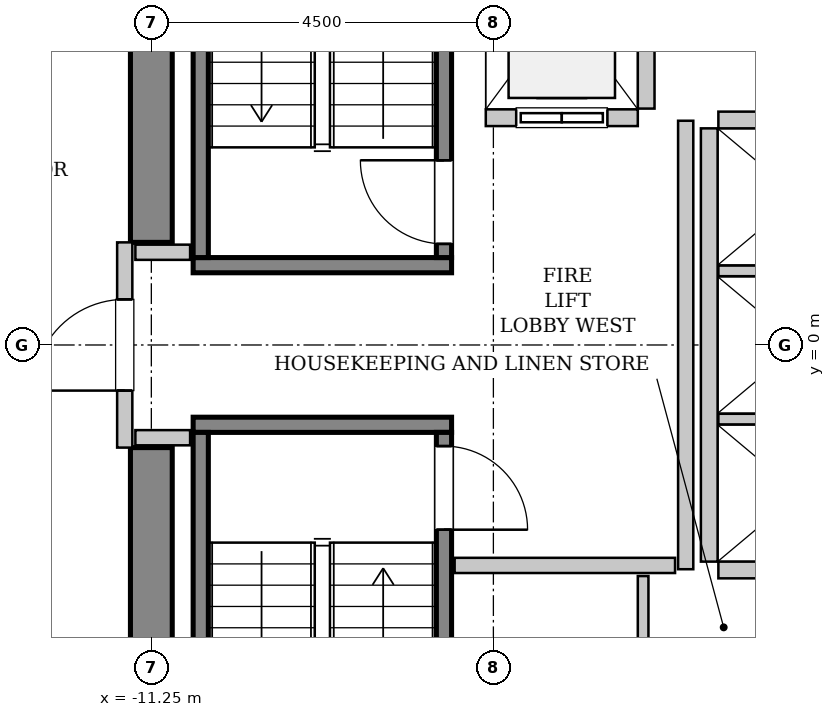
"""IFC4 building model, lengths in metres.
Left out: names, types, materials, properties, quantities, classifications, styles, units other than length and angle.
Written with IfcOpenShell. Run it as: python <this file> out.ifc"""

import sys

from ifc_helpers import new_model, si_unit, direction, frame, frame_2d, origin, place, context, subcontext, project, spatial, rectangle, extrude, source, transform, mapped, element, fill, save


model = new_model("IFC4")
c1 = context("Model", 3, precision=1e-05, world=origin(), true_north=direction((0.0, 1.0)))
c2 = subcontext(c1, "Body", "Model", "MODEL_VIEW")
j1 = project(units=[si_unit("LENGTHUNIT", "METRE"), si_unit("PLANEANGLEUNIT", "RADIAN")], contexts=[c1])
p1 = place(None, origin())
s1 = spatial("IfcSite", under=j1, at=p1, CompositionType="ELEMENT")
p2 = place(p1, origin())
s2 = spatial("IfcBuilding", under=s1, at=p2, CompositionType="ELEMENT")
p3 = place(p2, frame((0.0, 0.0, 109.8)))
s3 = spatial("IfcBuildingStorey", under=s2, at=p3, CompositionType="ELEMENT", Elevation=109.8)
m1 = source(origin(), c2, "Body", "SweptSolid", [
    extrude(rectangle(XDim=7.375, YDim=0.55, at=frame_2d((3.688, 0.0))), origin(), (0.0, 0.0, 1.0), 3.8),
])
for number, where, z_axis, x_axis in (
    (1, (-11.25, -8.725, 0.0), (0.0, 0.0, 1.0), (0.0, 1.0, 0.0)),
    (2, (-11.25, 1.35, 0.0), (0.0, 0.0, 1.0), (0.0, 1.0, 0.0)),
):
    element("IfcWall", number, at=place(p3, frame(where, z_axis=z_axis, x_axis=x_axis)), inside=s3, PredefinedType="SHEAR", context=c2, shape_type="MappedRepresentation", body=[
        mapped(m1, transform((0.0, 0.0, 0.0), x_axis=(1.0, 0.0, 0.0), y_axis=(0.0, 1.0, 0.0), z_axis=(0.0, 0.0, 1.0), scale=1.0)),
    ])
m2 = source(origin(), c2, "Body", "SweptSolid", [
    extrude(rectangle(XDim=3.4, YDim=0.2, at=frame_2d((1.7, 0.0))), origin(), (0.0, 0.0, 1.0), 3.8),
])
p4 = place(p3, frame((-7.3, 1.05, 0.0), z_axis=(0.0, 0.0, 1.0), x_axis=(-1.0, 0.0, 0.0)))
e3 = element("IfcWall", 3, at=p4, inside=s3, PredefinedType="SOLIDWALL", context=c2, shape_type="MappedRepresentation", body=[
    mapped(m2, transform((0.0, 0.0, 0.0), x_axis=(1.0, 0.0, 0.0), y_axis=(0.0, 1.0, 0.0), z_axis=(0.0, 0.0, 1.0), scale=1.0)),
])
m3 = source(origin(), c2, "Body", "SweptSolid", [
    extrude(rectangle(XDim=7.1, YDim=0.2, at=frame_2d((3.55, 0.0))), origin(), (0.0, 0.0, 1.0), 3.8),
])
p5 = place(p3, frame((-7.4, 1.15, 0.0), z_axis=(0.0, 0.0, 1.0), x_axis=(0.0, 1.0, 0.0)))
e4 = element("IfcWall", 4, at=p5, inside=s3, PredefinedType="SOLIDWALL", context=c2, shape_type="MappedRepresentation", body=[
    mapped(m3, transform((0.0, 0.0, 0.0), x_axis=(1.0, 0.0, 0.0), y_axis=(0.0, 1.0, 0.0), z_axis=(0.0, 0.0, 1.0), scale=1.0)),
])
p6 = place(p5, frame((0.18, 0.0, 0.0)))
e5 = element("IfcOpeningElement", 5, at=p6, cuts=e4, PredefinedType="OPENING", context=c2, shape_type="SweptSolid", body=[
    extrude(rectangle(XDim=1.1, YDim=2.15, at=frame_2d((0.55, 1.075))), frame((0.0, 0.11, 0.0), z_axis=(0.0, -1.0, 0.0), x_axis=(1.0, 0.0, 0.0)), (0.0, 0.0, 1.0), 0.22),
])
p7 = place(p3, frame((-10.6, 1.15, 0.0), z_axis=(0.0, 0.0, 1.0), x_axis=(0.0, 1.0, 0.0)))
e6 = element("IfcWall", 6, at=p7, inside=s3, PredefinedType="SOLIDWALL", context=c2, shape_type="MappedRepresentation", body=[
    mapped(m3, transform((0.0, 0.0, 0.0), x_axis=(1.0, 0.0, 0.0), y_axis=(0.0, 1.0, 0.0), z_axis=(0.0, 0.0, 1.0), scale=1.0)),
])
p8 = place(p3, frame((-10.7, -1.05, 0.0), z_axis=(0.0, 0.0, 1.0), x_axis=(1.0, 0.0, 0.0)))
e7 = element("IfcWall", 7, at=p8, inside=s3, PredefinedType="SOLIDWALL", context=c2, shape_type="MappedRepresentation", body=[
    mapped(m2, transform((0.0, 0.0, 0.0), x_axis=(1.0, 0.0, 0.0), y_axis=(0.0, 1.0, 0.0), z_axis=(0.0, 0.0, 1.0), scale=1.0)),
])
p9 = place(p3, frame((-10.6, -1.15, 0.0), z_axis=(0.0, 0.0, 1.0), x_axis=(0.0, -1.0, 0.0)))
e8 = element("IfcWall", 8, at=p9, inside=s3, PredefinedType="SOLIDWALL", context=c2, shape_type="MappedRepresentation", body=[
    mapped(m3, transform((0.0, 0.0, 0.0), x_axis=(1.0, 0.0, 0.0), y_axis=(0.0, 1.0, 0.0), z_axis=(0.0, 0.0, 1.0), scale=1.0)),
])
p10 = place(p3, frame((-7.4, -1.15, 0.0), z_axis=(0.0, 0.0, 1.0), x_axis=(0.0, -1.0, 0.0)))
e9 = element("IfcWall", 9, at=p10, inside=s3, PredefinedType="SOLIDWALL", context=c2, shape_type="MappedRepresentation", body=[
    mapped(m3, transform((0.0, 0.0, 0.0), x_axis=(1.0, 0.0, 0.0), y_axis=(0.0, 1.0, 0.0), z_axis=(0.0, 0.0, 1.0), scale=1.0)),
])
p11 = place(p10, frame((0.18, 0.0, 0.0)))
e10 = element("IfcOpeningElement", 10, at=p11, cuts=e9, PredefinedType="OPENING", context=c2, shape_type="SweptSolid", body=[
    extrude(rectangle(XDim=1.1, YDim=2.15, at=frame_2d((0.55, 1.075))), frame((0.0, 0.11, 0.0), z_axis=(0.0, -1.0, 0.0), x_axis=(1.0, 0.0, 0.0)), (0.0, 0.0, 1.0), 0.22),
])
m4 = source(origin(), c2, "Body", "SweptSolid", [
    extrude(rectangle(XDim=2.0, YDim=0.22, at=frame_2d((1.0, 0.0))), origin(), (0.0, 0.0, 1.0), 3.535),
])
p12 = place(p3, frame((-6.85, 2.99, 0.0), z_axis=(0.0, 0.0, 1.0), x_axis=(1.0, 0.0, 0.0)))
e11 = element("IfcWall", 11, at=p12, inside=s3, PredefinedType="SOLIDWALL", context=c2, shape_type="MappedRepresentation", body=[
    mapped(m4, transform((0.0, 0.0, 0.0), x_axis=(1.0, 0.0, 0.0), y_axis=(0.0, 1.0, 0.0), z_axis=(0.0, 0.0, 1.0), scale=1.0)),
])
p13 = place(p12, frame((0.4, 0.0, 0.0)))
e12 = element("IfcOpeningElement", 12, at=p13, cuts=e11, PredefinedType="OPENING", context=c2, shape_type="SweptSolid", body=[
    extrude(rectangle(XDim=1.2, YDim=2.2, at=frame_2d((0.6, 1.1))), frame((0.0, 0.12, 0.0), z_axis=(0.0, -1.0, 0.0), x_axis=(1.0, 0.0, 0.0)), (0.0, 0.0, 1.0), 0.24),
])
m5 = source(origin(), c2, "Body", "SweptSolid", [
    extrude(rectangle(XDim=2.68, YDim=0.22, at=frame_2d((1.34, 0.0))), origin(), (0.0, 0.0, 1.0), 3.535),
])
p14 = place(p3, frame((-4.74, 3.11, 0.0), z_axis=(0.0, 0.0, 1.0), x_axis=(0.0, 1.0, 0.0)))
e13 = element("IfcWall", 13, at=p14, inside=s3, PredefinedType="SOLIDWALL", context=c2, shape_type="MappedRepresentation", body=[
    mapped(m5, transform((0.0, 0.0, 0.0), x_axis=(1.0, 0.0, 0.0), y_axis=(0.0, 1.0, 0.0), z_axis=(0.0, 0.0, 1.0), scale=1.0)),
])
m6 = source(origin(), c2, "Body", "SweptSolid", [
    extrude(rectangle(XDim=5.7, YDim=0.22, at=frame_2d((2.85, 0.0))), origin(), (0.0, 0.0, 1.0), 3.535),
])
p15 = place(p3, frame((-3.91, 2.85, 0.0), z_axis=(0.0, 0.0, 1.0), x_axis=(0.0, -1.0, 0.0)))
e14 = element("IfcWall", 14, at=p15, inside=s3, PredefinedType="SOLIDWALL", context=c2, shape_type="MappedRepresentation", body=[
    mapped(m6, transform((0.0, 0.0, 0.0), x_axis=(1.0, 0.0, 0.0), y_axis=(0.0, 1.0, 0.0), z_axis=(0.0, 0.0, 1.0), scale=1.0)),
])
m7 = source(origin(), c2, "Body", "SweptSolid", [
    extrude(rectangle(XDim=2.13, YDim=0.22, at=frame_2d((1.065, 0.0))), origin(), (0.0, 0.0, 1.0), 3.535),
])
p16 = place(p3, frame((-3.79, -2.96, 0.0), z_axis=(0.0, 0.0, 1.0), x_axis=(1.0, 0.0, 0.0)))
e15 = element("IfcWall", 15, at=p16, inside=s3, PredefinedType="SOLIDWALL", context=c2, shape_type="MappedRepresentation", body=[
    mapped(m7, transform((0.0, 0.0, 0.0), x_axis=(1.0, 0.0, 0.0), y_axis=(0.0, 1.0, 0.0), z_axis=(0.0, 0.0, 1.0), scale=1.0)),
])
m8 = source(origin(), c2, "Body", "SweptSolid", [
    extrude(rectangle(XDim=2.13, YDim=0.14, at=frame_2d((1.065, 0.0))), origin(), (0.0, 0.0, 1.0), 3.535),
])
for number, where, z_axis, x_axis in (
    (16, (-3.79, -0.975, 0.0), (0.0, 0.0, 1.0), (1.0, 0.0, 0.0)),
    (17, (-3.79, 0.975, 0.0), (0.0, 0.0, 1.0), (1.0, 0.0, 0.0)),
):
    element("IfcWall", number, at=place(p3, frame(where, z_axis=z_axis, x_axis=x_axis)), inside=s3, PredefinedType="PARTITIONING", context=c2, shape_type="MappedRepresentation", body=[
        mapped(m8, transform((0.0, 0.0, 0.0), x_axis=(1.0, 0.0, 0.0), y_axis=(0.0, 1.0, 0.0), z_axis=(0.0, 0.0, 1.0), scale=1.0)),
    ])
p17 = place(p3, frame((-1.66, 2.96, 0.0), z_axis=(0.0, 0.0, 1.0), x_axis=(-1.0, 0.0, 0.0)))
e18 = element("IfcWall", 18, at=p17, inside=s3, PredefinedType="SOLIDWALL", context=c2, shape_type="MappedRepresentation", body=[
    mapped(m7, transform((0.0, 0.0, 0.0), x_axis=(1.0, 0.0, 0.0), y_axis=(0.0, 1.0, 0.0), z_axis=(0.0, 0.0, 1.0), scale=1.0)),
])
m9 = source(origin(), c2, "Body", "SweptSolid", [
    extrude(rectangle(XDim=2.7, YDim=0.2, at=frame_2d((1.35, 0.0))), origin(), (0.0, 0.0, 1.0), 2.425),
])
p18 = place(p3, frame((-11.6, -1.35, 0.0), z_axis=(0.0, 0.0, 1.0), x_axis=(0.0, 1.0, 0.0)))
e19 = element("IfcWall", 19, at=p18, inside=s3, PredefinedType="PARTITIONING", context=c2, shape_type="MappedRepresentation", body=[
    mapped(m9, transform((0.0, 0.0, 0.0), x_axis=(1.0, 0.0, 0.0), y_axis=(0.0, 1.0, 0.0), z_axis=(0.0, 0.0, 1.0), scale=1.0)),
])
p19 = place(p18, frame((0.75, 0.0, 0.0)))
e20 = element("IfcOpeningElement", 20, at=p19, cuts=e19, PredefinedType="OPENING", context=c2, shape_type="SweptSolid", body=[
    extrude(rectangle(XDim=1.2, YDim=2.15, at=frame_2d((0.6, 1.075))), frame((0.0, 0.11, 0.0), z_axis=(0.0, -1.0, 0.0), x_axis=(1.0, 0.0, 0.0)), (0.0, 0.0, 1.0), 0.22),
])
m10 = source(origin(), c2, "Body", "SweptSolid", [
    extrude(rectangle(XDim=5.9, YDim=0.2, at=frame_2d((2.95, 0.0))), origin(), (0.0, 0.0, 1.0), 3.535),
])
p20 = place(p3, frame((-4.22, -2.95, 0.0), z_axis=(0.0, 0.0, 1.0), x_axis=(0.0, 1.0, 0.0)))
e21 = element("IfcWall", 21, at=p20, inside=s3, PredefinedType="PARTITIONING", context=c2, shape_type="MappedRepresentation", body=[
    mapped(m10, transform((0.0, 0.0, 0.0), x_axis=(1.0, 0.0, 0.0), y_axis=(0.0, 1.0, 0.0), z_axis=(0.0, 0.0, 1.0), scale=1.0)),
])
m11 = source(origin(), c2, "Body", "SweptSolid", [
    extrude(rectangle(XDim=2.9, YDim=0.2, at=frame_2d((1.45, 0.0))), origin(), (0.0, 0.0, 1.0), 3.535),
])
p21 = place(p3, frame((-7.26, -2.9, 0.0), z_axis=(0.0, 0.0, 1.0), x_axis=(1.0, 0.0, 0.0)))
e22 = element("IfcWall", 22, at=p21, inside=s3, PredefinedType="PARTITIONING", context=c2, shape_type="MappedRepresentation", body=[
    mapped(m11, transform((0.0, 0.0, 0.0), x_axis=(1.0, 0.0, 0.0), y_axis=(0.0, 1.0, 0.0), z_axis=(0.0, 0.0, 1.0), scale=1.0)),
])
m12 = source(origin(), c2, "Body", "SweptSolid", [
    extrude(rectangle(XDim=0.72, YDim=0.2, at=frame_2d((0.36, 0.0))), origin(), (0.0, 0.0, 1.0), 3.535),
])
for number, where, z_axis, x_axis in (
    (23, (-11.46, 1.22, 0.0), (0.0, 0.0, 1.0), (1.0, 0.0, 0.0)),
    (24, (-11.46, -1.22, 0.0), (0.0, 0.0, 1.0), (1.0, 0.0, 0.0)),
):
    element("IfcWall", number, at=place(p3, frame(where, z_axis=z_axis, x_axis=x_axis)), inside=s3, PredefinedType="PARTITIONING", context=c2, shape_type="MappedRepresentation", body=[
        mapped(m12, transform((0.0, 0.0, 0.0), x_axis=(1.0, 0.0, 0.0), y_axis=(0.0, 1.0, 0.0), z_axis=(0.0, 0.0, 1.0), scale=1.0)),
    ])
m13 = source(origin(), c2, "Body", "SweptSolid", [
    extrude(rectangle(XDim=1.26, YDim=0.14, at=frame_2d((0.63, 0.0))), origin(), (0.0, 0.0, 1.0), 3.535),
])
p22 = place(p3, frame((-4.78, -4.3, 0.0), z_axis=(0.0, 0.0, 1.0), x_axis=(0.0, 1.0, 0.0)))
e25 = element("IfcWall", 25, at=p22, inside=s3, PredefinedType="PARTITIONING", context=c2, shape_type="MappedRepresentation", body=[
    mapped(m13, transform((0.0, 0.0, 0.0), x_axis=(1.0, 0.0, 0.0), y_axis=(0.0, 1.0, 0.0), z_axis=(0.0, 0.0, 1.0), scale=1.0)),
])
m14 = source(origin(), c2, "Body", "SweptSolid", [
    extrude(rectangle(XDim=1.1, YDim=2.15, at=frame_2d((0.55, 1.075))), frame((0.0, 0.025, 0.0), z_axis=(0.0, -1.0, 0.0), x_axis=(1.0, 0.0, 0.0)), (0.0, 0.0, 1.0), 0.05),
])
p23 = place(p6, origin())
e26 = element("IfcDoor", 26, at=p23, inside=s3, OperationType="SINGLE_SWING_RIGHT", PredefinedType="DOOR", context=c2, shape_type="MappedRepresentation", body=[
    mapped(m14, transform((0.0, 0.0, 0.0), x_axis=(1.0, 0.0, 0.0), y_axis=(0.0, 1.0, 0.0), z_axis=(0.0, 0.0, 1.0), scale=1.0)),
])
fill(e5, e26)
p24 = place(p11, origin())
e27 = element("IfcDoor", 27, at=p24, inside=s3, OperationType="SINGLE_SWING_RIGHT", PredefinedType="DOOR", context=c2, shape_type="MappedRepresentation", body=[
    mapped(m14, transform((0.0, 0.0, 0.0), x_axis=(1.0, 0.0, 0.0), y_axis=(0.0, 1.0, 0.0), z_axis=(0.0, 0.0, 1.0), scale=1.0)),
])
fill(e10, e27)
m15 = source(origin(), c2, "Body", "SweptSolid", [
    extrude(rectangle(XDim=1.2, YDim=2.2, at=frame_2d((0.6, 1.1))), frame((0.0, 0.025, 0.0), z_axis=(0.0, -1.0, 0.0), x_axis=(1.0, 0.0, 0.0)), (0.0, 0.0, 1.0), 0.05),
])
p25 = place(p13, origin())
e28 = element("IfcDoor", 28, at=p25, inside=s3, OperationType="SLIDING_TO_LEFT", PredefinedType="DOOR", context=c2, shape_type="MappedRepresentation", body=[
    mapped(m15, transform((0.0, 0.0, 0.0), x_axis=(1.0, 0.0, 0.0), y_axis=(0.0, 1.0, 0.0), z_axis=(0.0, 0.0, 1.0), scale=1.0)),
])
fill(e12, e28)
m16 = source(origin(), c2, "Body", "SweptSolid", [
    extrude(rectangle(XDim=1.2, YDim=2.15, at=frame_2d((0.6, 1.075))), frame((0.0, 0.025, 0.0), z_axis=(0.0, -1.0, 0.0), x_axis=(1.0, 0.0, 0.0)), (0.0, 0.0, 1.0), 0.05),
])
p26 = place(p19, origin())
e29 = element("IfcDoor", 29, at=p26, inside=s3, OperationType="SINGLE_SWING_LEFT", PredefinedType="DOOR", context=c2, shape_type="MappedRepresentation", body=[
    mapped(m16, transform((0.0, 0.0, 0.0), x_axis=(1.0, 0.0, 0.0), y_axis=(0.0, 1.0, 0.0), z_axis=(0.0, 0.0, 1.0), scale=1.0)),
])
fill(e20, e29)
save(model, sys.argv[1])
